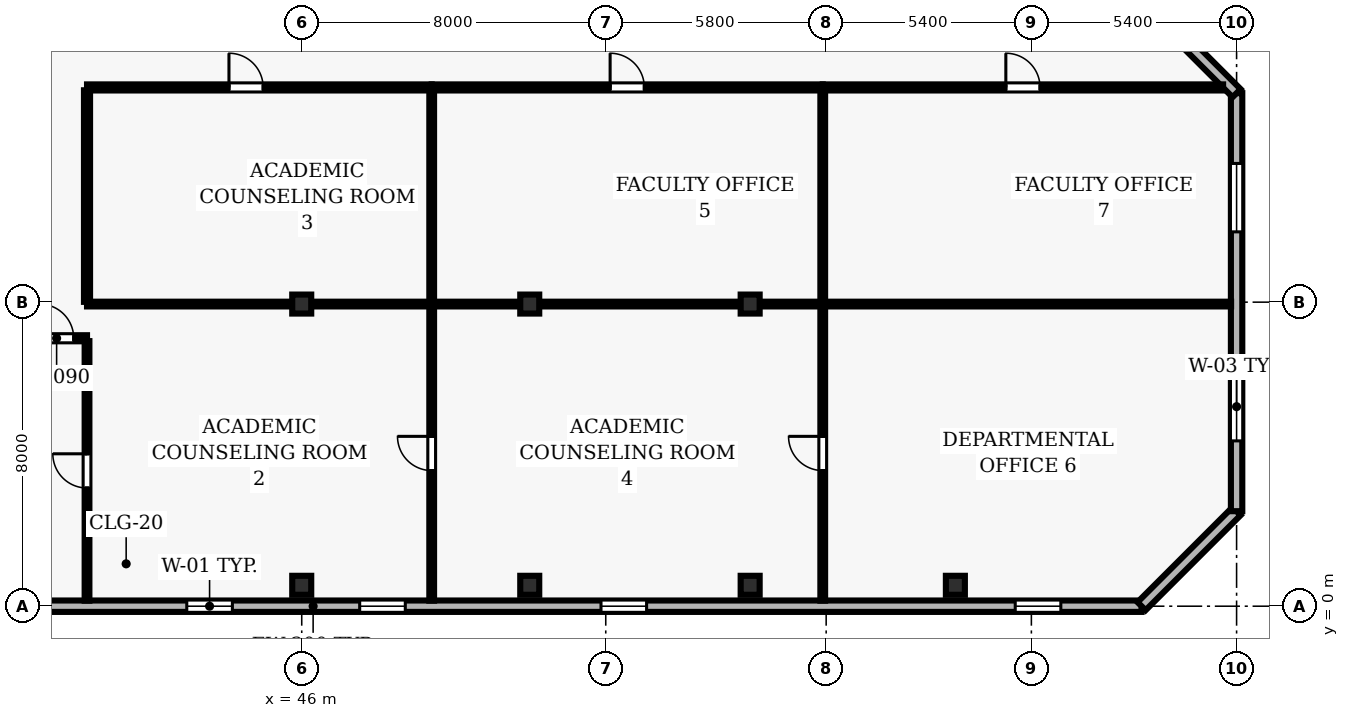
"""IFC4 building model, lengths in metres.
Left out: names, types, materials, properties, quantities, classifications, styles, units other than length and angle.
Written with IfcOpenShell. Run it as: python <this file> out.ifc"""

import sys

from ifc_helpers import new_model, si_unit, direction, frame, frame_2d, origin, origin_2d, place, context, subcontext, project, spatial, rectangle, hollow_rectangle, extrude, element, fill, save


model = new_model("IFC4")
c1 = context("Model", 3, precision=1e-05, world=origin(), true_north=direction((0.0, 1.0)))
c2 = subcontext(c1, "Body", "Model", "MODEL_VIEW")
j1 = project(units=[si_unit("LENGTHUNIT", "METRE"), si_unit("PLANEANGLEUNIT", "RADIAN")], contexts=[c1])
p1 = place(None, origin())
s1 = spatial("IfcSite", under=j1, at=p1, CompositionType="ELEMENT")
p2 = place(p1, origin())
s2 = spatial("IfcBuilding", under=s1, at=p2, CompositionType="ELEMENT")
p3 = place(p2, frame((0.0, 0.0, 150.2)))
s3 = spatial("IfcBuildingStorey", under=s2, at=p3, CompositionType="ELEMENT", Elevation=150.2)
for number, where, z_axis, x_axis in (
    (1, (46.0, 0.55, 0.0), (0.0, 0.0, 1.0), (1.0, 0.0, 0.0)),
    (2, (46.0, 7.95, 0.0), (0.0, 0.0, 1.0), (1.0, 0.0, 0.0)),
    (3, (52.0, 0.55, 0.0), (0.0, 0.0, 1.0), (1.0, 0.0, 0.0)),
    (4, (52.0, 7.95, 0.0), (0.0, 0.0, 1.0), (1.0, 0.0, 0.0)),
    (5, (57.8, 0.55, 0.0), (0.0, 0.0, 1.0), (1.0, 0.0, 0.0)),
    (6, (57.8, 7.95, 0.0), (0.0, 0.0, 1.0), (1.0, 0.0, 0.0)),
    (7, (63.2, 0.55, 0.0), (0.0, 0.0, 1.0), (1.0, 0.0, 0.0)),
):
    element("IfcColumn", number, at=place(p3, frame(where, z_axis=z_axis, x_axis=x_axis)), inside=s3, PredefinedType="COLUMN", context=c2, shape_type="SweptSolid", body=[
        extrude(hollow_rectangle(XDim=0.5, YDim=0.5, WallThickness=0.025, at=origin_2d()), origin(), (0.0, 0.0, 1.0), 3.9),
    ])
p4 = place(p3, frame((24.5, 0.0, 0.0), z_axis=(0.0, 0.0, 1.0), x_axis=(1.0, 0.0, 0.0)))
e8 = element("IfcWall", 8, at=p4, inside=s3, PredefinedType="SOLIDWALL", context=c2, shape_type="SweptSolid", body=[
    extrude(rectangle(XDim=43.6, YDim=0.3, at=frame_2d((21.8, 0.0))), origin(), (0.0, 0.0, 1.0), 3.69),
])
p5 = place(p4, frame((2.125, 0.0, 0.9)))
e9 = element("IfcOpeningElement", 9, at=p5, cuts=e8, PredefinedType="OPENING", context=c2, shape_type="SweptSolid", body=[
    extrude(rectangle(XDim=1.2, YDim=1.6, at=frame_2d((0.6, 0.8))), frame((0.0, 0.16, 0.0), z_axis=(0.0, -1.0, 0.0), x_axis=(1.0, 0.0, 0.0)), (0.0, 0.0, 1.0), 0.32),
])
p6 = place(p4, frame((8.475, 0.0, 0.9)))
e10 = element("IfcOpeningElement", 10, at=p6, cuts=e8, PredefinedType="OPENING", context=c2, shape_type="SweptSolid", body=[
    extrude(rectangle(XDim=1.2, YDim=1.6, at=frame_2d((0.6, 0.8))), frame((0.0, 0.16, 0.0), z_axis=(0.0, -1.0, 0.0), x_axis=(1.0, 0.0, 0.0)), (0.0, 0.0, 1.0), 0.32),
])
p7 = place(p4, frame((18.475, 0.0, 0.9)))
e11 = element("IfcOpeningElement", 11, at=p7, cuts=e8, PredefinedType="OPENING", context=c2, shape_type="SweptSolid", body=[
    extrude(rectangle(XDim=1.2, YDim=1.6, at=frame_2d((0.6, 0.8))), frame((0.0, 0.16, 0.0), z_axis=(0.0, -1.0, 0.0), x_axis=(1.0, 0.0, 0.0)), (0.0, 0.0, 1.0), 0.32),
])
p8 = place(p4, frame((23.025, 0.0, 0.9)))
e12 = element("IfcOpeningElement", 12, at=p8, cuts=e8, PredefinedType="OPENING", context=c2, shape_type="SweptSolid", body=[
    extrude(rectangle(XDim=1.2, YDim=1.6, at=frame_2d((0.6, 0.8))), frame((0.0, 0.16, 0.0), z_axis=(0.0, -1.0, 0.0), x_axis=(1.0, 0.0, 0.0)), (0.0, 0.0, 1.0), 0.32),
])
p9 = place(p4, frame((29.375, 0.0, 0.9)))
e13 = element("IfcOpeningElement", 13, at=p9, cuts=e8, PredefinedType="OPENING", context=c2, shape_type="SweptSolid", body=[
    extrude(rectangle(XDim=1.2, YDim=1.6, at=frame_2d((0.6, 0.8))), frame((0.0, 0.16, 0.0), z_axis=(0.0, -1.0, 0.0), x_axis=(1.0, 0.0, 0.0)), (0.0, 0.0, 1.0), 0.32),
])
p10 = place(p4, frame((40.275, 0.0, 0.9)))
e14 = element("IfcOpeningElement", 14, at=p10, cuts=e8, PredefinedType="OPENING", context=c2, shape_type="SweptSolid", body=[
    extrude(rectangle(XDim=1.2, YDim=1.6, at=frame_2d((0.6, 0.8))), frame((0.0, 0.16, 0.0), z_axis=(0.0, -1.0, 0.0), x_axis=(1.0, 0.0, 0.0)), (0.0, 0.0, 1.0), 0.32),
])
p11 = place(p3, frame((68.1, 0.0, 0.0), z_axis=(0.0, 0.0, 1.0), x_axis=(0.707106781187, 0.707106781187, 0.0)))
e15 = element("IfcWall", 15, at=p11, inside=s3, PredefinedType="SOLIDWALL", context=c2, shape_type="SweptSolid", body=[
    extrude(rectangle(XDim=3.536, YDim=0.3, at=frame_2d((1.768, 0.0))), origin(), (0.0, 0.0, 1.0), 3.69),
])
p12 = place(p3, frame((70.6, 2.5, 0.0), z_axis=(0.0, 0.0, 1.0), x_axis=(0.0, 1.0, 0.0)))
e16 = element("IfcWall", 16, at=p12, inside=s3, PredefinedType="SOLIDWALL", context=c2, shape_type="SweptSolid", body=[
    extrude(rectangle(XDim=11.0, YDim=0.3, at=frame_2d((5.5, 0.0))), origin(), (0.0, 0.0, 1.0), 3.69),
])
p13 = place(p12, frame((1.85, 0.0, 0.9)))
e17 = element("IfcOpeningElement", 17, at=p13, cuts=e16, PredefinedType="OPENING", context=c2, shape_type="SweptSolid", body=[
    extrude(rectangle(XDim=1.8, YDim=1.6, at=frame_2d((0.9, 0.8))), frame((0.0, 0.16, 0.0), z_axis=(0.0, -1.0, 0.0), x_axis=(1.0, 0.0, 0.0)), (0.0, 0.0, 1.0), 0.32),
])
p14 = place(p12, frame((7.35, 0.0, 0.9)))
e18 = element("IfcOpeningElement", 18, at=p14, cuts=e16, PredefinedType="OPENING", context=c2, shape_type="SweptSolid", body=[
    extrude(rectangle(XDim=1.8, YDim=1.6, at=frame_2d((0.9, 0.8))), frame((0.0, 0.16, 0.0), z_axis=(0.0, -1.0, 0.0), x_axis=(1.0, 0.0, 0.0)), (0.0, 0.0, 1.0), 0.32),
])
p15 = place(p3, frame((70.6, 13.5, 0.0), z_axis=(0.0, 0.0, 1.0), x_axis=(-0.707106781187, 0.707106781187, 0.0)))
e19 = element("IfcWall", 19, at=p15, inside=s3, PredefinedType="SOLIDWALL", context=c2, shape_type="SweptSolid", body=[
    extrude(rectangle(XDim=3.536, YDim=0.3, at=frame_2d((1.768, 0.0))), origin(), (0.0, 0.0, 1.0), 3.69),
])
p16 = place(p3, frame((38.05, 7.05, 0.0), z_axis=(0.0, 0.0, 1.0), x_axis=(1.0, 0.0, 0.0)))
e20 = element("IfcWall", 20, at=p16, inside=s3, PredefinedType="PARTITIONING", context=c2, shape_type="SweptSolid", body=[
    extrude(rectangle(XDim=2.3, YDim=0.16, at=frame_2d((1.15, 0.0))), origin(), (0.0, 0.0, 1.0), 3.69),
])
p17 = place(p16, frame((1.05, 0.0, 0.0)))
e21 = element("IfcOpeningElement", 21, at=p17, cuts=e20, PredefinedType="OPENING", context=c2, shape_type="SweptSolid", body=[
    extrude(rectangle(XDim=0.9, YDim=2.1, at=frame_2d((0.45, 1.05))), frame((0.0, 0.09, 0.0), z_axis=(0.0, -1.0, 0.0), x_axis=(1.0, 0.0, 0.0)), (0.0, 0.0, 1.0), 0.18),
])
p18 = place(p3, frame((40.35, 13.65, 0.0), z_axis=(0.0, 0.0, 1.0), x_axis=(1.0, 0.0, 0.0)))
e22 = element("IfcWall", 22, at=p18, inside=s3, PredefinedType="PARTITIONING", context=c2, shape_type="SweptSolid", body=[
    extrude(rectangle(XDim=9.07, YDim=0.16, at=frame_2d((4.535, 0.0))), origin(), (0.0, 0.0, 1.0), 3.69),
])
p19 = place(p18, frame((3.735, 0.0, 0.0)))
e23 = element("IfcOpeningElement", 23, at=p19, cuts=e22, PredefinedType="OPENING", context=c2, shape_type="SweptSolid", body=[
    extrude(rectangle(XDim=0.9, YDim=2.1, at=frame_2d((0.45, 1.05))), frame((0.0, 0.09, 0.0), z_axis=(0.0, -1.0, 0.0), x_axis=(1.0, 0.0, 0.0)), (0.0, 0.0, 1.0), 0.18),
])
p20 = place(p3, frame((49.42, 7.95, 0.0), z_axis=(0.0, 0.0, 1.0), x_axis=(-1.0, 0.0, 0.0)))
e24 = element("IfcWall", 24, at=p20, inside=s3, PredefinedType="PARTITIONING", context=c2, shape_type="SweptSolid", body=[
    extrude(rectangle(XDim=9.07, YDim=0.125, at=frame_2d((4.535, 0.0))), origin(), (0.0, 0.0, 1.0), 3.074),
])
p21 = place(p3, frame((49.42, 13.65, 0.0), z_axis=(0.0, 0.0, 1.0), x_axis=(1.0, 0.0, 0.0)))
e25 = element("IfcWall", 25, at=p21, inside=s3, PredefinedType="PARTITIONING", context=c2, shape_type="SweptSolid", body=[
    extrude(rectangle(XDim=10.29, YDim=0.16, at=frame_2d((5.145, 0.0))), origin(), (0.0, 0.0, 1.0), 3.69),
])
p22 = place(p21, frame((4.695, 0.0, 0.0)))
e26 = element("IfcOpeningElement", 26, at=p22, cuts=e25, PredefinedType="OPENING", context=c2, shape_type="SweptSolid", body=[
    extrude(rectangle(XDim=0.9, YDim=2.1, at=frame_2d((0.45, 1.05))), frame((0.0, 0.09, 0.0), z_axis=(0.0, -1.0, 0.0), x_axis=(1.0, 0.0, 0.0)), (0.0, 0.0, 1.0), 0.18),
])
p23 = place(p3, frame((59.71, 7.95, 0.0), z_axis=(0.0, 0.0, 1.0), x_axis=(-1.0, 0.0, 0.0)))
e27 = element("IfcWall", 27, at=p23, inside=s3, PredefinedType="PARTITIONING", context=c2, shape_type="SweptSolid", body=[
    extrude(rectangle(XDim=10.29, YDim=0.125, at=frame_2d((5.145, 0.0))), origin(), (0.0, 0.0, 1.0), 3.074),
])
p24 = place(p3, frame((59.71, 13.65, 0.0), z_axis=(0.0, 0.0, 1.0), x_axis=(1.0, 0.0, 0.0)))
e28 = element("IfcWall", 28, at=p24, inside=s3, PredefinedType="PARTITIONING", context=c2, shape_type="SweptSolid", body=[
    extrude(rectangle(XDim=10.535, YDim=0.16, at=frame_2d((5.268, 0.0))), origin(), (0.0, 0.0, 1.0), 3.69),
])
p25 = place(p24, frame((4.818, 0.0, 0.0)))
e29 = element("IfcOpeningElement", 29, at=p25, cuts=e28, PredefinedType="OPENING", context=c2, shape_type="SweptSolid", body=[
    extrude(rectangle(XDim=0.9, YDim=2.1, at=frame_2d((0.45, 1.05))), frame((0.0, 0.09, 0.0), z_axis=(0.0, -1.0, 0.0), x_axis=(1.0, 0.0, 0.0)), (0.0, 0.0, 1.0), 0.18),
])
p26 = place(p3, frame((70.455, 7.95, 0.0), z_axis=(0.0, 0.0, 1.0), x_axis=(-1.0, 0.0, 0.0)))
e30 = element("IfcWall", 30, at=p26, inside=s3, PredefinedType="PARTITIONING", context=c2, shape_type="SweptSolid", body=[
    extrude(rectangle(XDim=10.745, YDim=0.125, at=frame_2d((5.373, 0.0))), origin(), (0.0, 0.0, 1.0), 3.69),
])
p27 = place(p3, frame((40.35, 0.145, 0.0), z_axis=(0.0, 0.0, 1.0), x_axis=(0.0, 1.0, 0.0)))
e31 = element("IfcWall", 31, at=p27, inside=s3, PredefinedType="PARTITIONING", context=c2, shape_type="SweptSolid", body=[
    extrude(rectangle(XDim=6.83, YDim=0.125, at=frame_2d((3.415, 0.0))), origin(), (0.0, 0.0, 1.0), 3.69),
])
p28 = place(p27, frame((2.965, 0.0, 0.0)))
e32 = element("IfcOpeningElement", 32, at=p28, cuts=e31, PredefinedType="OPENING", context=c2, shape_type="SweptSolid", body=[
    extrude(rectangle(XDim=0.9, YDim=2.1, at=frame_2d((0.45, 1.05))), frame((0.0, 0.073, 0.0), z_axis=(0.0, -1.0, 0.0), x_axis=(1.0, 0.0, 0.0)), (0.0, 0.0, 1.0), 0.145),
])
p29 = place(p3, frame((40.35, 8.008, 0.0), z_axis=(0.0, 0.0, 1.0), x_axis=(0.0, 1.0, 0.0)))
e33 = element("IfcWall", 33, at=p29, inside=s3, PredefinedType="PARTITIONING", context=c2, shape_type="SweptSolid", body=[
    extrude(rectangle(XDim=5.567, YDim=0.16, at=frame_2d((2.783, 0.0))), origin(), (0.0, 0.0, 1.0), 3.69),
])
p30 = place(p3, frame((49.42, 0.145, 0.0), z_axis=(0.0, 0.0, 1.0), x_axis=(0.0, 1.0, 0.0)))
e34 = element("IfcWall", 34, at=p30, inside=s3, PredefinedType="PARTITIONING", context=c2, shape_type="SweptSolid", body=[
    extrude(rectangle(XDim=7.748, YDim=0.125, at=frame_2d((3.874, 0.0))), origin(), (0.0, 0.0, 1.0), 3.69),
])
p31 = place(p30, frame((3.424, 0.0, 0.0)))
e35 = element("IfcOpeningElement", 35, at=p31, cuts=e34, PredefinedType="OPENING", context=c2, shape_type="SweptSolid", body=[
    extrude(rectangle(XDim=0.9, YDim=2.1, at=frame_2d((0.45, 1.05))), frame((0.0, 0.073, 0.0), z_axis=(0.0, -1.0, 0.0), x_axis=(1.0, 0.0, 0.0)), (0.0, 0.0, 1.0), 0.145),
])
p32 = place(p3, frame((49.42, 8.008, 0.0), z_axis=(0.0, 0.0, 1.0), x_axis=(0.0, 1.0, 0.0)))
e36 = element("IfcWall", 36, at=p32, inside=s3, PredefinedType="PARTITIONING", context=c2, shape_type="SweptSolid", body=[
    extrude(rectangle(XDim=5.567, YDim=0.125, at=frame_2d((2.783, 0.0))), origin(), (0.0, 0.0, 1.0), 3.69),
])
p33 = place(p3, frame((59.71, 0.145, 0.0), z_axis=(0.0, 0.0, 1.0), x_axis=(0.0, 1.0, 0.0)))
e37 = element("IfcWall", 37, at=p33, inside=s3, PredefinedType="PARTITIONING", context=c2, shape_type="SweptSolid", body=[
    extrude(rectangle(XDim=7.748, YDim=0.125, at=frame_2d((3.874, 0.0))), origin(), (0.0, 0.0, 1.0), 3.69),
])
p34 = place(p33, frame((3.424, 0.0, 0.0)))
e38 = element("IfcOpeningElement", 38, at=p34, cuts=e37, PredefinedType="OPENING", context=c2, shape_type="SweptSolid", body=[
    extrude(rectangle(XDim=0.9, YDim=2.1, at=frame_2d((0.45, 1.05))), frame((0.0, 0.073, 0.0), z_axis=(0.0, -1.0, 0.0), x_axis=(1.0, 0.0, 0.0)), (0.0, 0.0, 1.0), 0.145),
])
p35 = place(p3, frame((59.71, 8.008, 0.0), z_axis=(0.0, 0.0, 1.0), x_axis=(0.0, 1.0, 0.0)))
e39 = element("IfcWall", 39, at=p35, inside=s3, PredefinedType="PARTITIONING", context=c2, shape_type="SweptSolid", body=[
    extrude(rectangle(XDim=5.567, YDim=0.125, at=frame_2d((2.783, 0.0))), origin(), (0.0, 0.0, 1.0), 3.69),
])
p36 = place(p7, origin())
e40 = element("IfcWindow", 40, at=p36, inside=s3, PartitioningType="SINGLE_PANEL", PredefinedType="WINDOW", context=c2, shape_type="SweptSolid", body=[
    extrude(rectangle(XDim=1.2, YDim=1.6, at=frame_2d((0.6, 0.8))), frame((0.0, 0.03, 0.0), z_axis=(0.0, -1.0, 0.0), x_axis=(1.0, 0.0, 0.0)), (0.0, 0.0, 1.0), 0.06),
])
fill(e11, e40)
p37 = place(p8, origin())
e41 = element("IfcWindow", 41, at=p37, inside=s3, PartitioningType="SINGLE_PANEL", PredefinedType="WINDOW", context=c2, shape_type="SweptSolid", body=[
    extrude(rectangle(XDim=1.2, YDim=1.6, at=frame_2d((0.6, 0.8))), frame((0.0, 0.03, 0.0), z_axis=(0.0, -1.0, 0.0), x_axis=(1.0, 0.0, 0.0)), (0.0, 0.0, 1.0), 0.06),
])
fill(e12, e41)
p38 = place(p9, origin())
e42 = element("IfcWindow", 42, at=p38, inside=s3, PartitioningType="SINGLE_PANEL", PredefinedType="WINDOW", context=c2, shape_type="SweptSolid", body=[
    extrude(rectangle(XDim=1.2, YDim=1.6, at=frame_2d((0.6, 0.8))), frame((0.0, 0.03, 0.0), z_axis=(0.0, -1.0, 0.0), x_axis=(1.0, 0.0, 0.0)), (0.0, 0.0, 1.0), 0.06),
])
fill(e13, e42)
p39 = place(p10, origin())
e43 = element("IfcWindow", 43, at=p39, inside=s3, PartitioningType="SINGLE_PANEL", PredefinedType="WINDOW", context=c2, shape_type="SweptSolid", body=[
    extrude(rectangle(XDim=1.2, YDim=1.6, at=frame_2d((0.6, 0.8))), frame((0.0, 0.03, 0.0), z_axis=(0.0, -1.0, 0.0), x_axis=(1.0, 0.0, 0.0)), (0.0, 0.0, 1.0), 0.06),
])
fill(e14, e43)
p40 = place(p13, origin())
e44 = element("IfcWindow", 44, at=p40, inside=s3, PartitioningType="SINGLE_PANEL", PredefinedType="WINDOW", context=c2, shape_type="SweptSolid", body=[
    extrude(rectangle(XDim=1.8, YDim=1.6, at=frame_2d((0.9, 0.8))), frame((0.0, 0.03, 0.0), z_axis=(0.0, -1.0, 0.0), x_axis=(1.0, 0.0, 0.0)), (0.0, 0.0, 1.0), 0.06),
])
fill(e17, e44)
p41 = place(p14, origin())
e45 = element("IfcWindow", 45, at=p41, inside=s3, PartitioningType="SINGLE_PANEL", PredefinedType="WINDOW", context=c2, shape_type="SweptSolid", body=[
    extrude(rectangle(XDim=1.8, YDim=1.6, at=frame_2d((0.9, 0.8))), frame((0.0, 0.03, 0.0), z_axis=(0.0, -1.0, 0.0), x_axis=(1.0, 0.0, 0.0)), (0.0, 0.0, 1.0), 0.06),
])
fill(e18, e45)
p42 = place(p17, origin())
e46 = element("IfcDoor", 46, at=p42, inside=s3, OperationType="SINGLE_SWING_LEFT", PredefinedType="DOOR", context=c2, shape_type="SweptSolid", body=[
    extrude(rectangle(XDim=0.9, YDim=2.1, at=frame_2d((0.45, 1.05))), frame((0.0, 0.025, 0.0), z_axis=(0.0, -1.0, 0.0), x_axis=(1.0, 0.0, 0.0)), (0.0, 0.0, 1.0), 0.05),
])
fill(e21, e46)
p43 = place(p28, origin())
e47 = element("IfcDoor", 47, at=p43, inside=s3, OperationType="SINGLE_SWING_RIGHT", PredefinedType="DOOR", context=c2, shape_type="SweptSolid", body=[
    extrude(rectangle(XDim=0.9, YDim=2.1, at=frame_2d((0.45, 1.05))), frame((0.0, 0.025, 0.0), z_axis=(0.0, -1.0, 0.0), x_axis=(1.0, 0.0, 0.0)), (0.0, 0.0, 1.0), 0.05),
])
fill(e32, e47)
p44 = place(p19, origin())
e48 = element("IfcDoor", 48, at=p44, inside=s3, OperationType="SINGLE_SWING_LEFT", PredefinedType="DOOR", context=c2, shape_type="SweptSolid", body=[
    extrude(rectangle(XDim=0.9, YDim=2.1, at=frame_2d((0.45, 1.05))), frame((0.0, 0.025, 0.0), z_axis=(0.0, -1.0, 0.0), x_axis=(1.0, 0.0, 0.0)), (0.0, 0.0, 1.0), 0.05),
])
fill(e23, e48)
p45 = place(p31, origin())
e49 = element("IfcDoor", 49, at=p45, inside=s3, OperationType="SINGLE_SWING_RIGHT", PredefinedType="DOOR", context=c2, shape_type="SweptSolid", body=[
    extrude(rectangle(XDim=0.9, YDim=2.1, at=frame_2d((0.45, 1.05))), frame((0.0, 0.025, 0.0), z_axis=(0.0, -1.0, 0.0), x_axis=(1.0, 0.0, 0.0)), (0.0, 0.0, 1.0), 0.05),
])
fill(e35, e49)
p46 = place(p22, origin())
e50 = element("IfcDoor", 50, at=p46, inside=s3, OperationType="SINGLE_SWING_LEFT", PredefinedType="DOOR", context=c2, shape_type="SweptSolid", body=[
    extrude(rectangle(XDim=0.9, YDim=2.1, at=frame_2d((0.45, 1.05))), frame((0.0, 0.025, 0.0), z_axis=(0.0, -1.0, 0.0), x_axis=(1.0, 0.0, 0.0)), (0.0, 0.0, 1.0), 0.05),
])
fill(e26, e50)
p47 = place(p34, origin())
e51 = element("IfcDoor", 51, at=p47, inside=s3, OperationType="SINGLE_SWING_RIGHT", PredefinedType="DOOR", context=c2, shape_type="SweptSolid", body=[
    extrude(rectangle(XDim=0.9, YDim=2.1, at=frame_2d((0.45, 1.05))), frame((0.0, 0.025, 0.0), z_axis=(0.0, -1.0, 0.0), x_axis=(1.0, 0.0, 0.0)), (0.0, 0.0, 1.0), 0.05),
])
fill(e38, e51)
p48 = place(p25, origin())
e52 = element("IfcDoor", 52, at=p48, inside=s3, OperationType="SINGLE_SWING_LEFT", PredefinedType="DOOR", context=c2, shape_type="SweptSolid", body=[
    extrude(rectangle(XDim=0.9, YDim=2.1, at=frame_2d((0.45, 1.05))), frame((0.0, 0.025, 0.0), z_axis=(0.0, -1.0, 0.0), x_axis=(1.0, 0.0, 0.0)), (0.0, 0.0, 1.0), 0.05),
])
fill(e29, e52)
save(model, sys.argv[1])
